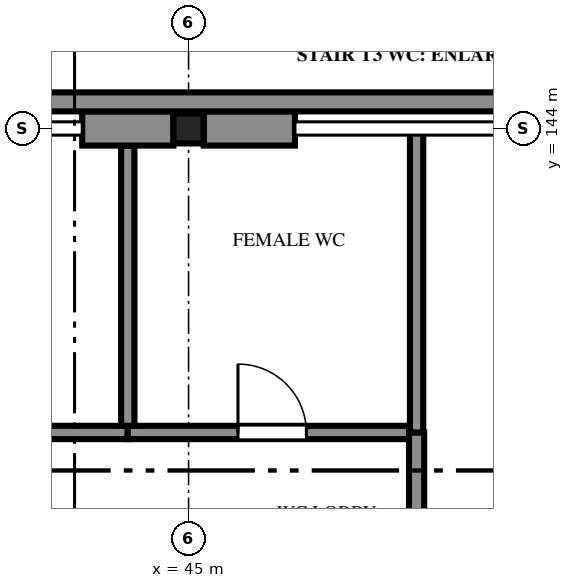
"""IFC4 building model, lengths in metres.
Left out: names, types, materials, properties, quantities, classifications, styles, units other than length and angle.
Written with IfcOpenShell. Run it as: python <this file> out.ifc"""

import sys

from ifc_helpers import new_model, si_unit, direction, frame, frame_2d, origin, origin_2d, place, context, subcontext, project, spatial, polyline, rectangle, i_section, outline, extrude, element, fill, save


model = new_model("IFC4")
c1 = context("Model", 3, precision=1e-05, world=origin(), true_north=direction((0.0, 1.0)))
c2 = subcontext(c1, "Body", "Model", "MODEL_VIEW")
j1 = project(units=[si_unit("LENGTHUNIT", "METRE"), si_unit("PLANEANGLEUNIT", "RADIAN")], contexts=[c1])
p1 = place(None, origin())
s1 = spatial("IfcSite", under=j1, at=p1, CompositionType="ELEMENT")
p2 = place(p1, origin())
s2 = spatial("IfcBuilding", under=s1, at=p2, CompositionType="ELEMENT")
p3 = place(p2, origin())
s3 = spatial("IfcBuildingStorey", under=s2, at=p3, CompositionType="ELEMENT", Elevation=0.0)
p4 = place(p3, frame((45.0, 144.0, -2.1), z_axis=(0.0, 0.0, 1.0), x_axis=(1.0, 0.0, 0.0)))
e1 = element("IfcColumn", 1, at=p4, inside=s3, PredefinedType="COLUMN", context=c2, shape_type="SweptSolid", body=[
    extrude(i_section(OverallWidth=0.399, OverallDepth=0.394, WebThickness=0.016, FlangeThickness=0.025, FilletRadius=0.015, at=origin_2d()), origin(), (0.0, 0.0, 1.0), 9.6),
])
for number, where, z_axis, x_axis in (
    (2, (43.601, 144.0, 0.0), (0.0, 0.0, 1.0), (1.0, 0.0, 0.0)),
    (3, (45.199, 144.0, 0.0), (0.0, 0.0, 1.0), (1.0, 0.0, 0.0)),
):
    element("IfcWall", number, at=place(p3, frame(where, z_axis=z_axis, x_axis=x_axis)), inside=s3, PredefinedType="SOLIDWALL", context=c2, shape_type="SweptSolid", body=[
        extrude(rectangle(XDim=1.2, YDim=0.45, at=frame_2d((0.6, 0.0))), origin(), (0.0, 0.0, 1.0), 6.46),
    ])
p5 = place(p3, frame((33.15, 144.35, 0.0), z_axis=(0.0, 0.0, 1.0), x_axis=(1.0, 0.0, 0.0)))
e4 = element("IfcWall", 4, at=p5, inside=s3, PredefinedType="SOLIDWALL", context=c2, shape_type="SweptSolid", body=[
    extrude(outline(polyline([(4.25, 0.0), (4.25, 3.3), (4.374, 4.028), (4.87, 4.652), (5.304, 4.808), (5.676, 5.224), (6.482, 5.64), (7.35, 5.9), (8.218, 5.64), (9.024, 5.224), (9.396, 4.808), (9.83, 4.652), (10.326, 4.028), (10.45, 3.3), (10.45, 0.0), (13.25, 0.0), (13.25, 3.3), (13.374, 4.028), (13.87, 4.652), (14.304, 4.808), (14.676, 5.224), (15.482, 5.64), (16.35, 5.9), (17.218, 5.64), (18.024, 5.224), (18.396, 4.808), (18.83, 4.652), (19.326, 4.028), (19.45, 3.3), (19.45, 0.0), (20.85, 0.0), (20.85, 6.46), (0.0, 6.46), (0.0, 0.0), (4.25, 0.0)])), frame((0.0, 0.125, 0.0), z_axis=(0.0, -1.0, 0.0), x_axis=(1.0, 0.0, 0.0)), (0.0, 0.0, 1.0), 0.25),
])
p6 = place(p3, frame((48.0, 138.1, 0.0), z_axis=(0.0, 0.0, 1.0), x_axis=(0.0, 1.0, 0.0)))
e5 = element("IfcWall", 5, at=p6, inside=s3, PredefinedType="PARTITIONING", context=c2, shape_type="SweptSolid", body=[
    extrude(rectangle(XDim=1.9, YDim=0.2, at=frame_2d((0.95, 0.0))), origin(), (0.0, 0.0, 1.0), 6.6),
])
p7 = place(p3, frame((48.0, 140.0, 0.0), z_axis=(0.0, 0.0, 1.0), x_axis=(0.0, 1.0, 0.0)))
e6 = element("IfcWall", 6, at=p7, inside=s3, PredefinedType="PARTITIONING", context=c2, shape_type="SweptSolid", body=[
    extrude(rectangle(XDim=4.0, YDim=0.175, at=frame_2d((2.0, 0.0))), origin(), (0.0, 0.0, 1.0), 6.459),
])
p8 = place(p3, frame((40.4, 140.0, 0.0), z_axis=(0.0, 0.0, 1.0), x_axis=(1.0, 0.0, 0.0)))
e7 = element("IfcWall", 7, at=p8, inside=s3, PredefinedType="PARTITIONING", context=c2, shape_type="SweptSolid", body=[
    extrude(rectangle(XDim=3.8, YDim=0.175, at=frame_2d((1.9, 0.0))), origin(), (0.0, 0.0, 1.0), 6.459),
])
p9 = place(p8, frame((1.45, 0.0, 0.0)))
e8 = element("IfcOpeningElement", 8, at=p9, cuts=e7, PredefinedType="OPENING", context=c2, shape_type="SweptSolid", body=[
    extrude(rectangle(XDim=0.9, YDim=2.1, at=frame_2d((0.45, 1.05))), frame((0.0, 0.097, 0.0), z_axis=(0.0, -1.0, 0.0), x_axis=(1.0, 0.0, 0.0)), (0.0, 0.0, 1.0), 0.195),
])
p10 = place(p3, frame((44.2, 140.0, 0.0), z_axis=(0.0, 0.0, 1.0), x_axis=(1.0, 0.0, 0.0)))
e9 = element("IfcWall", 9, at=p10, inside=s3, PredefinedType="PARTITIONING", context=c2, shape_type="SweptSolid", body=[
    extrude(rectangle(XDim=3.7, YDim=0.175, at=frame_2d((1.85, 0.0))), origin(), (0.0, 0.0, 1.0), 6.459),
])
p11 = place(p10, frame((1.45, 0.0, 0.0)))
e10 = element("IfcOpeningElement", 10, at=p11, cuts=e9, PredefinedType="OPENING", context=c2, shape_type="SweptSolid", body=[
    extrude(rectangle(XDim=0.9, YDim=2.1, at=frame_2d((0.45, 1.05))), frame((0.0, 0.097, 0.0), z_axis=(0.0, -1.0, 0.0), x_axis=(1.0, 0.0, 0.0)), (0.0, 0.0, 1.0), 0.195),
])
p12 = place(p3, frame((44.2, 143.773, 0.0), z_axis=(0.0, 0.0, 1.0), x_axis=(0.0, -1.0, 0.0)))
e11 = element("IfcWall", 11, at=p12, inside=s3, PredefinedType="PARTITIONING", context=c2, shape_type="SweptSolid", body=[
    extrude(rectangle(XDim=3.686, YDim=0.175, at=frame_2d((1.843, 0.0))), origin(), (0.0, 0.0, 1.0), 6.459),
])
p13 = place(p11, origin())
e12 = element("IfcDoor", 12, at=p13, inside=s3, OperationType="SINGLE_SWING_LEFT", PredefinedType="DOOR", context=c2, shape_type="SweptSolid", body=[
    extrude(outline(polyline([(0.0, 0.0), (0.07, 0.0), (0.07, 2.03), (0.83, 2.03), (0.83, 0.0), (0.9, 0.0), (0.9, 2.1), (0.0, 2.1), (0.0, 0.0)])), frame((0.0, 0.025, 0.0), z_axis=(0.0, -1.0, 0.0), x_axis=(1.0, 0.0, 0.0)), (0.0, 0.0, 1.0), 0.05),
    extrude(outline(polyline([(0.074, 0.01), (0.826, 0.01), (0.826, 2.026), (0.074, 2.026), (0.074, 0.01)]), holes=[polyline([(0.194, 0.16), (0.706, 0.16), (0.706, 1.01), (0.194, 1.01), (0.194, 0.16)]), polyline([(0.3, 1.16), (0.6, 1.16), (0.6, 1.76), (0.3, 1.76), (0.3, 1.16)])]), frame((0.0, 0.017, 0.0), z_axis=(0.0, -1.0, 0.0), x_axis=(1.0, 0.0, 0.0)), (0.0, 0.0, 1.0), 0.035),
    extrude(rectangle(XDim=0.512, YDim=0.85, at=frame_2d((0.45, 0.585))), frame((0.0, 0.009, 0.0), z_axis=(0.0, -1.0, 0.0), x_axis=(1.0, 0.0, 0.0)), (0.0, 0.0, 1.0), 0.017),
    extrude(rectangle(XDim=0.3, YDim=0.6, at=frame_2d((0.45, 1.46))), frame((0.0, 0.006, 0.0), z_axis=(0.0, -1.0, 0.0), x_axis=(1.0, 0.0, 0.0)), (0.0, 0.0, 1.0), 0.012),
])
fill(e10, e12)
save(model, sys.argv[1])
